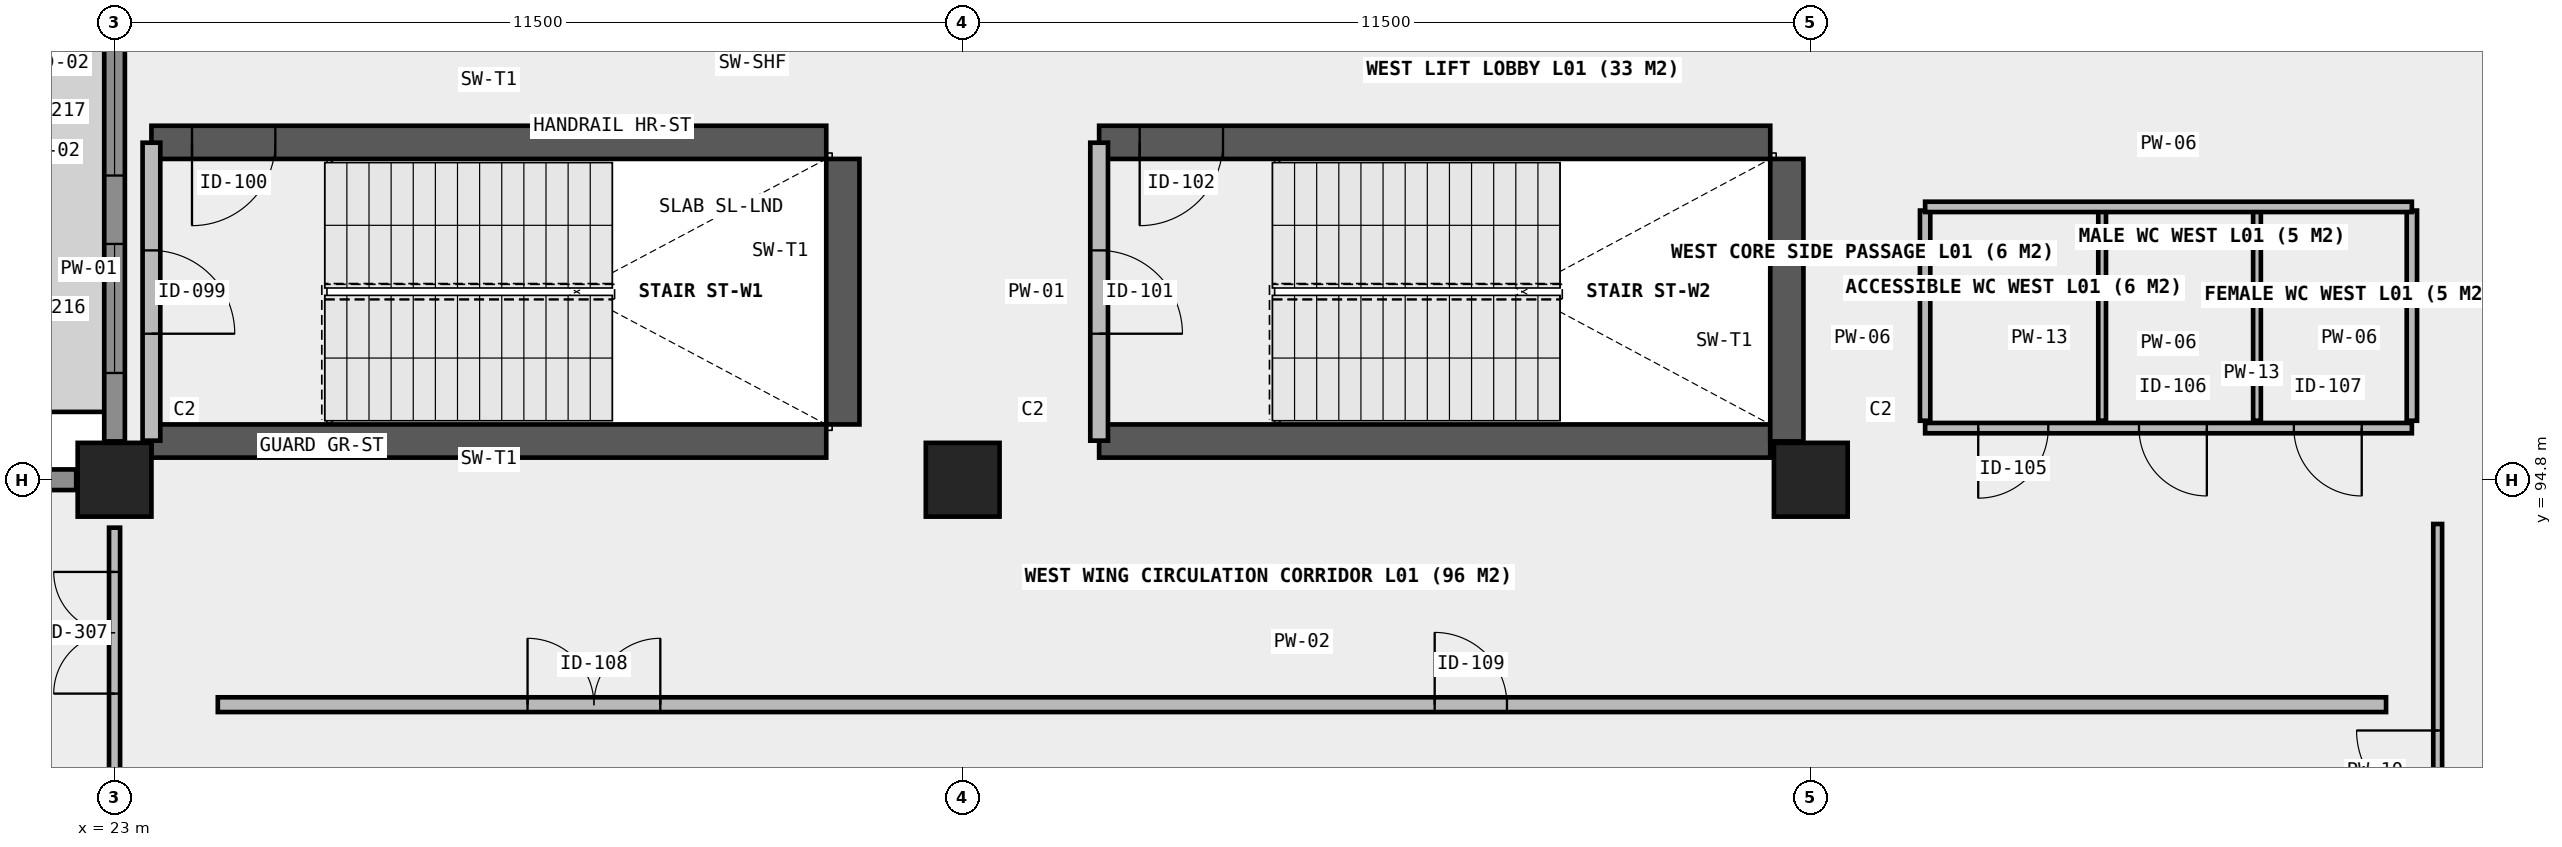
"""IFC4 building model, lengths in metres.
Left out: names, types, materials, properties, quantities, classifications, styles, units other than length and angle.
Written with IfcOpenShell. Run it as: python <this file> out.ifc"""

import sys

from ifc_helpers import new_model, si_unit, direction, frame, frame_2d, origin, origin_2d, place, context, subcontext, project, spatial, rectangle, extrude, element, fill, save


model = new_model("IFC4")
c1 = context("Model", 3, precision=1e-05, world=origin(), true_north=direction((0.0, 1.0)))
c2 = subcontext(c1, "Body", "Model", "MODEL_VIEW")
j1 = project(units=[si_unit("LENGTHUNIT", "METRE"), si_unit("PLANEANGLEUNIT", "RADIAN")], contexts=[c1])
p1 = place(None, origin())
s1 = spatial("IfcSite", under=j1, at=p1, CompositionType="ELEMENT")
p2 = place(p1, origin())
s2 = spatial("IfcBuilding", under=s1, at=p2, CompositionType="ELEMENT")
p3 = place(p2, frame((0.0, 0.0, 4.2)))
s3 = spatial("IfcBuildingStorey", under=s2, at=p3, CompositionType="ELEMENT", Elevation=4.2)
for number, where, z_axis, x_axis in (
    (1, (23.0, 94.8, 0.0), (0.0, 0.0, 1.0), (1.0, 0.0, 0.0)),
    (2, (34.5, 94.8, 0.0), (0.0, 0.0, 1.0), (1.0, 0.0, 0.0)),
    (3, (46.0, 94.8, 0.0), (0.0, 0.0, 1.0), (1.0, 0.0, 0.0)),
):
    element("IfcColumn", number, at=place(p3, frame(where, z_axis=z_axis, x_axis=x_axis)), inside=s3, PredefinedType="COLUMN", context=c2, shape_type="SweptSolid", body=[
        extrude(rectangle(XDim=1.0, YDim=1.0, at=origin_2d()), origin(), (0.0, 0.0, 1.0), 4.2),
    ])
p4 = place(p3, frame((23.5, 95.325, 0.0), z_axis=(0.0, 0.0, 1.0), x_axis=(1.0, 0.0, 0.0)))
e4 = element("IfcWall", 4, at=p4, inside=s3, PredefinedType="SHEAR", context=c2, shape_type="SweptSolid", body=[
    extrude(rectangle(XDim=9.15, YDim=0.45, at=frame_2d((4.575, 0.0))), origin(), (0.0, 0.0, 1.0), 4.2),
])
p5 = place(p3, frame((23.5, 99.375, 0.0), z_axis=(0.0, 0.0, 1.0), x_axis=(1.0, 0.0, 0.0)))
e5 = element("IfcWall", 5, at=p5, inside=s3, PredefinedType="SHEAR", context=c2, shape_type="SweptSolid", body=[
    extrude(rectangle(XDim=9.15, YDim=0.45, at=frame_2d((4.575, 0.0))), origin(), (0.0, 0.0, 1.0), 4.2),
])
p6 = place(p5, frame((0.55, 0.0, 0.0)))
e6 = element("IfcOpeningElement", 6, at=p6, cuts=e5, PredefinedType="OPENING", context=c2, shape_type="SweptSolid", body=[
    extrude(rectangle(XDim=1.13, YDim=2.15, at=frame_2d((0.565, 1.075))), frame((0.0, 0.235, 0.0), z_axis=(0.0, -1.0, 0.0), x_axis=(1.0, 0.0, 0.0)), (0.0, 0.0, 1.0), 0.47),
])
p7 = place(p3, frame((32.875, 95.55, 0.0), z_axis=(0.0, 0.0, 1.0), x_axis=(0.0, 1.0, 0.0)))
e7 = element("IfcWall", 7, at=p7, inside=s3, PredefinedType="SHEAR", context=c2, shape_type="SweptSolid", body=[
    extrude(rectangle(XDim=3.6, YDim=0.45, at=frame_2d((1.8, 0.0))), origin(), (0.0, 0.0, 1.0), 4.2),
])
p8 = place(p3, frame((36.35, 95.325, 0.0), z_axis=(0.0, 0.0, 1.0), x_axis=(1.0, 0.0, 0.0)))
e8 = element("IfcWall", 8, at=p8, inside=s3, PredefinedType="SHEAR", context=c2, shape_type="SweptSolid", body=[
    extrude(rectangle(XDim=9.1, YDim=0.45, at=frame_2d((4.55, 0.0))), origin(), (0.0, 0.0, 1.0), 4.2),
])
p9 = place(p3, frame((36.35, 99.375, 0.0), z_axis=(0.0, 0.0, 1.0), x_axis=(1.0, 0.0, 0.0)))
e9 = element("IfcWall", 9, at=p9, inside=s3, PredefinedType="SHEAR", context=c2, shape_type="SweptSolid", body=[
    extrude(rectangle(XDim=9.1, YDim=0.45, at=frame_2d((4.55, 0.0))), origin(), (0.0, 0.0, 1.0), 4.2),
])
p10 = place(p9, frame((0.55, 0.0, 0.0)))
e10 = element("IfcOpeningElement", 10, at=p10, cuts=e9, PredefinedType="OPENING", context=c2, shape_type="SweptSolid", body=[
    extrude(rectangle(XDim=1.13, YDim=2.15, at=frame_2d((0.565, 1.075))), frame((0.0, 0.235, 0.0), z_axis=(0.0, -1.0, 0.0), x_axis=(1.0, 0.0, 0.0)), (0.0, 0.0, 1.0), 0.47),
])
p11 = place(p3, frame((45.675, 95.32, 0.0), z_axis=(0.0, 0.0, 1.0), x_axis=(0.0, 1.0, 0.0)))
e11 = element("IfcWall", 11, at=p11, inside=s3, PredefinedType="SHEAR", context=c2, shape_type="SweptSolid", body=[
    extrude(rectangle(XDim=3.83, YDim=0.45, at=frame_2d((1.915, 0.0))), origin(), (0.0, 0.0, 1.0), 4.2),
])
p12 = place(p3, frame((23.0, 95.32, 0.0), z_axis=(0.0, 0.0, 1.0), x_axis=(0.0, 1.0, 0.0)))
e12 = element("IfcWall", 12, at=p12, inside=s3, PredefinedType="SOLIDWALL", context=c2, shape_type="SweptSolid", body=[
    extrude(rectangle(XDim=8.96, YDim=0.28, at=frame_2d((4.48, 0.0))), origin(), (0.0, 0.0, 1.0), 3.15),
])
p13 = place(p12, frame((0.927, 0.0, 0.85)))
e13 = element("IfcOpeningElement", 13, at=p13, cuts=e12, PredefinedType="OPENING", context=c2, shape_type="SweptSolid", body=[
    extrude(rectangle(XDim=1.75, YDim=1.95, at=frame_2d((0.875, 0.975))), frame((0.0, 0.15, 0.0), z_axis=(0.0, -1.0, 0.0), x_axis=(1.0, 0.0, 0.0)), (0.0, 0.0, 1.0), 0.3),
])
p14 = place(p12, frame((3.605, 0.0, 0.85)))
e14 = element("IfcOpeningElement", 14, at=p14, cuts=e12, PredefinedType="OPENING", context=c2, shape_type="SweptSolid", body=[
    extrude(rectangle(XDim=1.75, YDim=1.95, at=frame_2d((0.875, 0.975))), frame((0.0, 0.15, 0.0), z_axis=(0.0, -1.0, 0.0), x_axis=(1.0, 0.0, 0.0)), (0.0, 0.0, 1.0), 0.3),
])
p15 = place(p12, frame((6.282, 0.0, 0.85)))
e15 = element("IfcOpeningElement", 15, at=p15, cuts=e12, PredefinedType="OPENING", context=c2, shape_type="SweptSolid", body=[
    extrude(rectangle(XDim=1.75, YDim=1.95, at=frame_2d((0.875, 0.975))), frame((0.0, 0.15, 0.0), z_axis=(0.0, -1.0, 0.0), x_axis=(1.0, 0.0, 0.0)), (0.0, 0.0, 1.0), 0.3),
])
p16 = place(p3, frame((12.02, 94.8, 0.0), z_axis=(0.0, 0.0, 1.0), x_axis=(1.0, 0.0, 0.0)))
e16 = element("IfcWall", 16, at=p16, inside=s3, PredefinedType="SOLIDWALL", context=c2, shape_type="SweptSolid", body=[
    extrude(rectangle(XDim=10.46, YDim=0.28, at=frame_2d((5.23, 0.0))), origin(), (0.0, 0.0, 1.0), 3.15),
])
p17 = place(p16, frame((1.302, 0.0, 0.85)))
e17 = element("IfcOpeningElement", 17, at=p17, cuts=e16, PredefinedType="OPENING", context=c2, shape_type="SweptSolid", body=[
    extrude(rectangle(XDim=1.75, YDim=1.95, at=frame_2d((0.875, 0.975))), frame((0.0, 0.15, 0.0), z_axis=(0.0, -1.0, 0.0), x_axis=(1.0, 0.0, 0.0)), (0.0, 0.0, 1.0), 0.3),
])
p18 = place(p16, frame((4.355, 0.0, 0.85)))
e18 = element("IfcOpeningElement", 18, at=p18, cuts=e16, PredefinedType="OPENING", context=c2, shape_type="SweptSolid", body=[
    extrude(rectangle(XDim=1.75, YDim=1.95, at=frame_2d((0.875, 0.975))), frame((0.0, 0.15, 0.0), z_axis=(0.0, -1.0, 0.0), x_axis=(1.0, 0.0, 0.0)), (0.0, 0.0, 1.0), 0.3),
])
p19 = place(p16, frame((7.407, 0.0, 0.85)))
e19 = element("IfcOpeningElement", 19, at=p19, cuts=e16, PredefinedType="OPENING", context=c2, shape_type="SweptSolid", body=[
    extrude(rectangle(XDim=1.75, YDim=1.95, at=frame_2d((0.875, 0.975))), frame((0.0, 0.15, 0.0), z_axis=(0.0, -1.0, 0.0), x_axis=(1.0, 0.0, 0.0)), (0.0, 0.0, 1.0), 0.3),
])
p20 = place(p3, frame((23.5, 95.33, 0.0), z_axis=(0.0, 0.0, 1.0), x_axis=(0.0, 1.0, 0.0)))
e20 = element("IfcWall", 20, at=p20, inside=s3, PredefinedType="SOLIDWALL", context=c2, shape_type="SweptSolid", body=[
    extrude(rectangle(XDim=4.04, YDim=0.24, at=frame_2d((2.02, 0.0))), origin(), (0.0, 0.0, 1.0), 3.84),
])
p21 = place(p20, frame((1.45, 0.0, 0.0)))
e21 = element("IfcOpeningElement", 21, at=p21, cuts=e20, PredefinedType="OPENING", context=c2, shape_type="SweptSolid", body=[
    extrude(rectangle(XDim=1.13, YDim=2.15, at=frame_2d((0.565, 1.075))), frame((0.0, 0.13, 0.0), z_axis=(0.0, -1.0, 0.0), x_axis=(1.0, 0.0, 0.0)), (0.0, 0.0, 1.0), 0.26),
])
p22 = place(p3, frame((36.35, 95.33, 0.0), z_axis=(0.0, 0.0, 1.0), x_axis=(0.0, 1.0, 0.0)))
e22 = element("IfcWall", 22, at=p22, inside=s3, PredefinedType="SOLIDWALL", context=c2, shape_type="SweptSolid", body=[
    extrude(rectangle(XDim=4.04, YDim=0.24, at=frame_2d((2.02, 0.0))), origin(), (0.0, 0.0, 1.0), 3.84),
])
p23 = place(p22, frame((1.45, 0.0, 0.0)))
e23 = element("IfcOpeningElement", 23, at=p23, cuts=e22, PredefinedType="OPENING", context=c2, shape_type="SweptSolid", body=[
    extrude(rectangle(XDim=1.13, YDim=2.15, at=frame_2d((0.565, 1.075))), frame((0.0, 0.13, 0.0), z_axis=(0.0, -1.0, 0.0), x_axis=(1.0, 0.0, 0.0)), (0.0, 0.0, 1.0), 0.26),
])
p24 = place(p3, frame((47.55, 95.5, 0.0), z_axis=(0.0, 0.0, 1.0), x_axis=(1.0, 0.0, 0.0)))
e24 = element("IfcWall", 24, at=p24, inside=s3, PredefinedType="PLUMBINGWALL", context=c2, shape_type="SweptSolid", body=[
    extrude(rectangle(XDim=6.6, YDim=0.14, at=frame_2d((3.3, 0.0))), origin(), (0.0, 0.0, 1.0), 3.84),
])
p25 = place(p24, frame((0.72, 0.0, 0.0)))
e25 = element("IfcOpeningElement", 25, at=p25, cuts=e24, PredefinedType="OPENING", context=c2, shape_type="SweptSolid", body=[
    extrude(rectangle(XDim=0.95, YDim=2.1, at=frame_2d((0.475, 1.05))), frame((0.0, 0.08, 0.0), z_axis=(0.0, -1.0, 0.0), x_axis=(1.0, 0.0, 0.0)), (0.0, 0.0, 1.0), 0.16),
])
p26 = place(p24, frame((2.9, 0.0, 0.0)))
e26 = element("IfcOpeningElement", 26, at=p26, cuts=e24, PredefinedType="OPENING", context=c2, shape_type="SweptSolid", body=[
    extrude(rectangle(XDim=0.92, YDim=2.1, at=frame_2d((0.46, 1.05))), frame((0.0, 0.08, 0.0), z_axis=(0.0, -1.0, 0.0), x_axis=(1.0, 0.0, 0.0)), (0.0, 0.0, 1.0), 0.16),
])
p27 = place(p24, frame((5.0, 0.0, 0.0)))
e27 = element("IfcOpeningElement", 27, at=p27, cuts=e24, PredefinedType="OPENING", context=c2, shape_type="SweptSolid", body=[
    extrude(rectangle(XDim=0.92, YDim=2.1, at=frame_2d((0.46, 1.05))), frame((0.0, 0.08, 0.0), z_axis=(0.0, -1.0, 0.0), x_axis=(1.0, 0.0, 0.0)), (0.0, 0.0, 1.0), 0.16),
])
p28 = place(p3, frame((47.55, 95.6, 0.0), z_axis=(0.0, 0.0, 1.0), x_axis=(0.0, 1.0, 0.0)))
e28 = element("IfcWall", 28, at=p28, inside=s3, PredefinedType="PLUMBINGWALL", context=c2, shape_type="SweptSolid", body=[
    extrude(rectangle(XDim=2.85, YDim=0.14, at=frame_2d((1.425, 0.0))), origin(), (0.0, 0.0, 1.0), 3.84),
])
p29 = place(p3, frame((49.95, 95.6, 0.0), z_axis=(0.0, 0.0, 1.0), x_axis=(0.0, 1.0, 0.0)))
e29 = element("IfcWall", 29, at=p29, inside=s3, PredefinedType="PARTITIONING", context=c2, shape_type="SweptSolid", body=[
    extrude(rectangle(XDim=2.85, YDim=0.105, at=frame_2d((1.425, 0.0))), origin(), (0.0, 0.0, 1.0), 3.4),
])
p30 = place(p3, frame((52.05, 95.6, 0.0), z_axis=(0.0, 0.0, 1.0), x_axis=(0.0, 1.0, 0.0)))
e30 = element("IfcWall", 30, at=p30, inside=s3, PredefinedType="PARTITIONING", context=c2, shape_type="SweptSolid", body=[
    extrude(rectangle(XDim=2.85, YDim=0.105, at=frame_2d((1.425, 0.0))), origin(), (0.0, 0.0, 1.0), 3.84),
])
p31 = place(p3, frame((54.15, 95.6, 0.0), z_axis=(0.0, 0.0, 1.0), x_axis=(0.0, 1.0, 0.0)))
e31 = element("IfcWall", 31, at=p31, inside=s3, PredefinedType="PLUMBINGWALL", context=c2, shape_type="SweptSolid", body=[
    extrude(rectangle(XDim=2.85, YDim=0.14, at=frame_2d((1.425, 0.0))), origin(), (0.0, 0.0, 1.0), 3.84),
])
p32 = place(p3, frame((47.55, 98.5, 0.0), z_axis=(0.0, 0.0, 1.0), x_axis=(1.0, 0.0, 0.0)))
e32 = element("IfcWall", 32, at=p32, inside=s3, PredefinedType="PLUMBINGWALL", context=c2, shape_type="SweptSolid", body=[
    extrude(rectangle(XDim=6.6, YDim=0.14, at=frame_2d((3.3, 0.0))), origin(), (0.0, 0.0, 1.0), 3.84),
])
p33 = place(p3, frame((24.4, 91.75, 0.0), z_axis=(0.0, 0.0, 1.0), x_axis=(1.0, 0.0, 0.0)))
e33 = element("IfcWall", 33, at=p33, inside=s3, PredefinedType="PARTITIONING", context=c2, shape_type="SweptSolid", body=[
    extrude(rectangle(XDim=29.4, YDim=0.2, at=frame_2d((14.7, 0.0))), origin(), (0.0, 0.0, 1.0), 3.84),
])
p34 = place(p33, frame((4.2, 0.0, 0.0)))
e34 = element("IfcOpeningElement", 34, at=p34, cuts=e33, PredefinedType="OPENING", context=c2, shape_type="SweptSolid", body=[
    extrude(rectangle(XDim=1.8, YDim=2.2, at=frame_2d((0.9, 1.1))), frame((0.0, 0.11, 0.0), z_axis=(0.0, -1.0, 0.0), x_axis=(1.0, 0.0, 0.0)), (0.0, 0.0, 1.0), 0.22),
])
p35 = place(p33, frame((16.5, 0.0, 0.0)))
e35 = element("IfcOpeningElement", 35, at=p35, cuts=e33, PredefinedType="OPENING", context=c2, shape_type="SweptSolid", body=[
    extrude(rectangle(XDim=0.98, YDim=2.15, at=frame_2d((0.49, 1.075))), frame((0.0, 0.11, 0.0), z_axis=(0.0, -1.0, 0.0), x_axis=(1.0, 0.0, 0.0)), (0.0, 0.0, 1.0), 0.22),
])
p36 = place(p3, frame((54.5, 86.4, 0.0), z_axis=(0.0, 0.0, 1.0), x_axis=(0.0, 1.0, 0.0)))
e36 = element("IfcWall", 36, at=p36, inside=s3, PredefinedType="MOVABLE", context=c2, shape_type="SweptSolid", body=[
    extrude(rectangle(XDim=7.8, YDim=0.12, at=frame_2d((3.9, 0.0))), origin(), (0.0, 0.0, 1.0), 3.84),
])
p37 = place(p36, frame((2.8, 0.0, 0.0)))
e37 = element("IfcOpeningElement", 37, at=p37, cuts=e36, PredefinedType="OPENING", context=c2, shape_type="SweptSolid", body=[
    extrude(rectangle(XDim=2.2, YDim=2.4, at=frame_2d((1.1, 1.2))), frame((0.0, 0.07, 0.0), z_axis=(0.0, -1.0, 0.0), x_axis=(1.0, 0.0, 0.0)), (0.0, 0.0, 1.0), 0.14),
])
p38 = place(p3, frame((23.0, 86.45, 0.0), z_axis=(0.0, 0.0, 1.0), x_axis=(0.0, 1.0, 0.0)))
e38 = element("IfcWall", 38, at=p38, inside=s3, PredefinedType="PARTITIONING", context=c2, shape_type="SweptSolid", body=[
    extrude(rectangle(XDim=7.7, YDim=0.15, at=frame_2d((3.85, 0.0))), origin(), (0.0, 0.0, 1.0), 3.15),
])
p39 = place(p38, frame((5.45, 0.0, 0.0)))
e39 = element("IfcOpeningElement", 39, at=p39, cuts=e38, PredefinedType="OPENING", context=c2, shape_type="SweptSolid", body=[
    extrude(rectangle(XDim=1.65, YDim=2.2, at=frame_2d((0.825, 1.1))), frame((0.0, 0.085, 0.0), z_axis=(0.0, -1.0, 0.0), x_axis=(1.0, 0.0, 0.0)), (0.0, 0.0, 1.0), 0.17),
])
p40 = place(p13, origin())
e40 = element("IfcWindow", 40, at=p40, inside=s3, PartitioningType="SINGLE_PANEL", PredefinedType="WINDOW", context=c2, shape_type="SweptSolid", body=[
    extrude(rectangle(XDim=1.75, YDim=1.95, at=frame_2d((0.875, 0.975))), frame((0.0, 0.03, 0.0), z_axis=(0.0, -1.0, 0.0), x_axis=(1.0, 0.0, 0.0)), (0.0, 0.0, 1.0), 0.06),
])
fill(e13, e40)
p41 = place(p14, origin())
e41 = element("IfcWindow", 41, at=p41, inside=s3, PartitioningType="SINGLE_PANEL", PredefinedType="WINDOW", context=c2, shape_type="SweptSolid", body=[
    extrude(rectangle(XDim=1.75, YDim=1.95, at=frame_2d((0.875, 0.975))), frame((0.0, 0.03, 0.0), z_axis=(0.0, -1.0, 0.0), x_axis=(1.0, 0.0, 0.0)), (0.0, 0.0, 1.0), 0.06),
])
fill(e14, e41)
p42 = place(p21, frame((0.565, 0.0, 0.0), z_axis=(0.0, 0.0, 1.0), x_axis=(-1.0, 0.0, 0.0)))
e42 = element("IfcDoor", 42, at=p42, inside=s3, OperationType="SINGLE_SWING_LEFT", PredefinedType="DOOR", context=c2, shape_type="SweptSolid", body=[
    extrude(rectangle(XDim=1.13, YDim=2.15, at=frame_2d((0.0, 1.075))), frame((0.0, 0.025, 0.0), z_axis=(0.0, -1.0, 0.0), x_axis=(1.0, 0.0, 0.0)), (0.0, 0.0, 1.0), 0.05),
])
fill(e21, e42)
p43 = place(p6, frame((0.565, 0.0, 0.0), z_axis=(0.0, 0.0, 1.0), x_axis=(-1.0, 0.0, 0.0)))
e43 = element("IfcDoor", 43, at=p43, inside=s3, OperationType="SINGLE_SWING_LEFT", PredefinedType="DOOR", context=c2, shape_type="SweptSolid", body=[
    extrude(rectangle(XDim=1.13, YDim=2.15, at=frame_2d((0.0, 1.075))), frame((0.0, 0.025, 0.0), z_axis=(0.0, -1.0, 0.0), x_axis=(1.0, 0.0, 0.0)), (0.0, 0.0, 1.0), 0.05),
])
fill(e6, e43)
p44 = place(p23, frame((0.565, 0.0, 0.0), z_axis=(0.0, 0.0, 1.0), x_axis=(-1.0, 0.0, 0.0)))
e44 = element("IfcDoor", 44, at=p44, inside=s3, OperationType="SINGLE_SWING_LEFT", PredefinedType="DOOR", context=c2, shape_type="SweptSolid", body=[
    extrude(rectangle(XDim=1.13, YDim=2.15, at=frame_2d((0.0, 1.075))), frame((0.0, 0.025, 0.0), z_axis=(0.0, -1.0, 0.0), x_axis=(1.0, 0.0, 0.0)), (0.0, 0.0, 1.0), 0.05),
])
fill(e23, e44)
p45 = place(p10, frame((0.565, 0.0, 0.0), z_axis=(0.0, 0.0, 1.0), x_axis=(-1.0, 0.0, 0.0)))
e45 = element("IfcDoor", 45, at=p45, inside=s3, OperationType="SINGLE_SWING_LEFT", PredefinedType="DOOR", context=c2, shape_type="SweptSolid", body=[
    extrude(rectangle(XDim=1.13, YDim=2.15, at=frame_2d((0.0, 1.075))), frame((0.0, 0.025, 0.0), z_axis=(0.0, -1.0, 0.0), x_axis=(1.0, 0.0, 0.0)), (0.0, 0.0, 1.0), 0.05),
])
fill(e10, e45)
p46 = place(p25, frame((0.475, 0.0, 0.0), z_axis=(0.0, 0.0, 1.0), x_axis=(-1.0, 0.0, 0.0)))
e46 = element("IfcDoor", 46, at=p46, inside=s3, OperationType="SINGLE_SWING_LEFT", PredefinedType="DOOR", context=c2, shape_type="SweptSolid", body=[
    extrude(rectangle(XDim=0.95, YDim=2.1, at=frame_2d((0.0, 1.05))), frame((0.0, 0.025, 0.0), z_axis=(0.0, -1.0, 0.0), x_axis=(1.0, 0.0, 0.0)), (0.0, 0.0, 1.0), 0.05),
])
fill(e25, e46)
p47 = place(p26, origin())
e47 = element("IfcDoor", 47, at=p47, inside=s3, OperationType="SINGLE_SWING_RIGHT", PredefinedType="DOOR", context=c2, shape_type="SweptSolid", body=[
    extrude(rectangle(XDim=0.92, YDim=2.1, at=frame_2d((0.46, 1.05))), frame((0.0, 0.025, 0.0), z_axis=(0.0, -1.0, 0.0), x_axis=(1.0, 0.0, 0.0)), (0.0, 0.0, 1.0), 0.05),
])
fill(e26, e47)
p48 = place(p27, origin())
e48 = element("IfcDoor", 48, at=p48, inside=s3, OperationType="SINGLE_SWING_RIGHT", PredefinedType="DOOR", context=c2, shape_type="SweptSolid", body=[
    extrude(rectangle(XDim=0.92, YDim=2.1, at=frame_2d((0.46, 1.05))), frame((0.0, 0.025, 0.0), z_axis=(0.0, -1.0, 0.0), x_axis=(1.0, 0.0, 0.0)), (0.0, 0.0, 1.0), 0.05),
])
fill(e27, e48)
p49 = place(p34, origin())
e49 = element("IfcDoor", 49, at=p49, inside=s3, OperationType="DOUBLE_DOOR_SINGLE_SWING", PredefinedType="DOOR", context=c2, shape_type="SweptSolid", body=[
    extrude(rectangle(XDim=1.8, YDim=2.2, at=frame_2d((0.9, 1.1))), frame((0.0, 0.025, 0.0), z_axis=(0.0, -1.0, 0.0), x_axis=(1.0, 0.0, 0.0)), (0.0, 0.0, 1.0), 0.05),
])
fill(e34, e49)
p50 = place(p35, origin())
e50 = element("IfcDoor", 50, at=p50, inside=s3, OperationType="SINGLE_SWING_LEFT", PredefinedType="DOOR", context=c2, shape_type="SweptSolid", body=[
    extrude(rectangle(XDim=0.98, YDim=2.15, at=frame_2d((0.49, 1.075))), frame((0.0, 0.025, 0.0), z_axis=(0.0, -1.0, 0.0), x_axis=(1.0, 0.0, 0.0)), (0.0, 0.0, 1.0), 0.05),
])
fill(e35, e50)
p51 = place(p37, origin())
e51 = element("IfcDoor", 51, at=p51, inside=s3, OperationType="DOUBLE_DOOR_SINGLE_SWING", PredefinedType="DOOR", context=c2, shape_type="SweptSolid", body=[
    extrude(rectangle(XDim=2.2, YDim=2.4, at=frame_2d((1.1, 1.2))), frame((0.0, 0.025, 0.0), z_axis=(0.0, -1.0, 0.0), x_axis=(1.0, 0.0, 0.0)), (0.0, 0.0, 1.0), 0.05),
])
fill(e37, e51)
p52 = place(p39, origin())
e52 = element("IfcDoor", 52, at=p52, inside=s3, OperationType="DOUBLE_DOOR_SINGLE_SWING", PredefinedType="DOOR", context=c2, shape_type="SweptSolid", body=[
    extrude(rectangle(XDim=1.65, YDim=2.2, at=frame_2d((0.825, 1.1))), frame((0.0, 0.025, 0.0), z_axis=(0.0, -1.0, 0.0), x_axis=(1.0, 0.0, 0.0)), (0.0, 0.0, 1.0), 0.05),
])
fill(e39, e52)
save(model, sys.argv[1])
